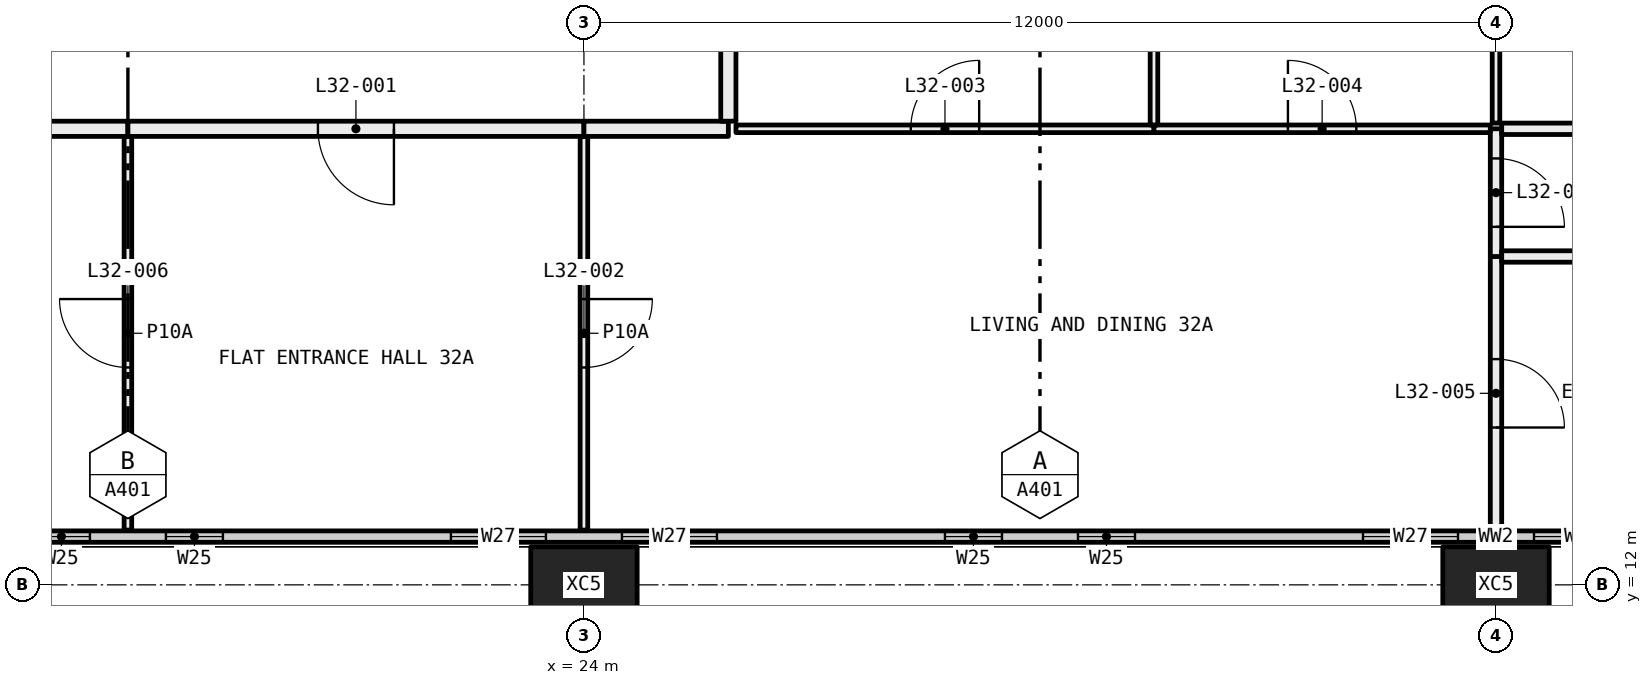
"""IFC4 building model, lengths in metres.
Left out: names, types, materials, properties, quantities, classifications, styles, units other than length and angle.
Written with IfcOpenShell. Run it as: python <this file> out.ifc"""

import sys

from ifc_helpers import new_model, si_unit, direction, frame, frame_2d, origin, origin_2d, place, context, subcontext, project, spatial, rectangle, hollow_rectangle, extrude, element, fill, save


model = new_model("IFC4")
c1 = context("Model", 3, precision=1e-05, world=origin(), true_north=direction((0.0, 1.0)))
c2 = subcontext(c1, "Body", "Model", "MODEL_VIEW")
j1 = project(units=[si_unit("LENGTHUNIT", "METRE"), si_unit("PLANEANGLEUNIT", "RADIAN")], contexts=[c1])
p1 = place(None, origin())
s1 = spatial("IfcSite", under=j1, at=p1, CompositionType="ELEMENT")
p2 = place(p1, origin())
s2 = spatial("IfcBuilding", under=s1, at=p2, CompositionType="ELEMENT")
p3 = place(p2, frame((0.0, 0.0, 124.2)))
s3 = spatial("IfcBuildingStorey", under=s2, at=p3, CompositionType="ELEMENT", Elevation=124.2)
for number, where, z_axis, x_axis in (
    (1, (24.0, 12.0, -0.4), (0.0, 0.0, 1.0), (1.0, 0.0, 0.0)),
    (2, (36.0, 12.0, -0.4), (0.0, 0.0, 1.0), (1.0, 0.0, 0.0)),
):
    element("IfcColumn", number, at=place(p3, frame(where, z_axis=z_axis, x_axis=x_axis)), inside=s3, PredefinedType="COLUMN", context=c2, shape_type="SweptSolid", body=[
        extrude(hollow_rectangle(XDim=1.4, YDim=1.0, WallThickness=0.055, at=origin_2d()), origin(), (0.0, 0.0, 1.0), 3.45),
    ])
p4 = place(p3, frame((6.56, 12.635, 0.0), z_axis=(0.0, 0.0, 1.0), x_axis=(1.0, 0.0, 0.0)))
e3 = element("IfcWall", 3, at=p4, inside=s3, PredefinedType="ELEMENTEDWALL", context=c2, shape_type="SweptSolid", body=[
    extrude(rectangle(XDim=58.88, YDim=0.15, at=frame_2d((29.44, 0.0))), origin(), (0.0, 0.0, 1.0), 3.05),
])
p5 = place(p4, frame((0.44, 0.0, 0.45)))
e4 = element("IfcOpeningElement", 4, at=p5, cuts=e3, PredefinedType="OPENING", context=c2, shape_type="SweptSolid", body=[
    extrude(rectangle(XDim=4.5, YDim=2.55, at=frame_2d((2.25, 1.275))), frame((0.0, 0.085, 0.0), z_axis=(0.0, -1.0, 0.0), x_axis=(1.0, 0.0, 0.0)), (0.0, 0.0, 1.0), 0.17),
])
p6 = place(p4, frame((5.94, 0.0, 0.45)))
e5 = element("IfcOpeningElement", 5, at=p6, cuts=e3, PredefinedType="OPENING", context=c2, shape_type="SweptSolid", body=[
    extrude(rectangle(XDim=1.25, YDim=2.55, at=frame_2d((0.625, 1.275))), frame((0.0, 0.085, 0.0), z_axis=(0.0, -1.0, 0.0), x_axis=(1.0, 0.0, 0.0)), (0.0, 0.0, 1.0), 0.17),
])
p7 = place(p4, frame((10.19, 0.0, 0.45)))
e6 = element("IfcOpeningElement", 6, at=p7, cuts=e3, PredefinedType="OPENING", context=c2, shape_type="SweptSolid", body=[
    extrude(rectangle(XDim=0.75, YDim=2.55, at=frame_2d((0.375, 1.275))), frame((0.0, 0.085, 0.0), z_axis=(0.0, -1.0, 0.0), x_axis=(1.0, 0.0, 0.0)), (0.0, 0.0, 1.0), 0.17),
])
p8 = place(p4, frame((11.94, 0.0, 0.45)))
e7 = element("IfcOpeningElement", 7, at=p8, cuts=e3, PredefinedType="OPENING", context=c2, shape_type="SweptSolid", body=[
    extrude(rectangle(XDim=0.75, YDim=2.55, at=frame_2d((0.375, 1.275))), frame((0.0, 0.085, 0.0), z_axis=(0.0, -1.0, 0.0), x_axis=(1.0, 0.0, 0.0)), (0.0, 0.0, 1.0), 0.17),
])
p9 = place(p4, frame((15.69, 0.0, 0.45)))
e8 = element("IfcOpeningElement", 8, at=p9, cuts=e3, PredefinedType="OPENING", context=c2, shape_type="SweptSolid", body=[
    extrude(rectangle(XDim=1.25, YDim=2.55, at=frame_2d((0.625, 1.275))), frame((0.0, 0.085, 0.0), z_axis=(0.0, -1.0, 0.0), x_axis=(1.0, 0.0, 0.0)), (0.0, 0.0, 1.0), 0.17),
])
p10 = place(p4, frame((17.94, 0.0, 0.45)))
e9 = element("IfcOpeningElement", 9, at=p10, cuts=e3, PredefinedType="OPENING", context=c2, shape_type="SweptSolid", body=[
    extrude(rectangle(XDim=1.25, YDim=2.55, at=frame_2d((0.625, 1.275))), frame((0.0, 0.085, 0.0), z_axis=(0.0, -1.0, 0.0), x_axis=(1.0, 0.0, 0.0)), (0.0, 0.0, 1.0), 0.17),
])
p11 = place(p4, frame((22.19, 0.0, 0.45)))
e10 = element("IfcOpeningElement", 10, at=p11, cuts=e3, PredefinedType="OPENING", context=c2, shape_type="SweptSolid", body=[
    extrude(rectangle(XDim=0.75, YDim=2.55, at=frame_2d((0.375, 1.275))), frame((0.0, 0.085, 0.0), z_axis=(0.0, -1.0, 0.0), x_axis=(1.0, 0.0, 0.0)), (0.0, 0.0, 1.0), 0.17),
])
p12 = place(p4, frame((23.94, 0.0, 0.45)))
e11 = element("IfcOpeningElement", 11, at=p12, cuts=e3, PredefinedType="OPENING", context=c2, shape_type="SweptSolid", body=[
    extrude(rectangle(XDim=0.75, YDim=2.55, at=frame_2d((0.375, 1.275))), frame((0.0, 0.085, 0.0), z_axis=(0.0, -1.0, 0.0), x_axis=(1.0, 0.0, 0.0)), (0.0, 0.0, 1.0), 0.17),
])
p13 = place(p4, frame((27.69, 0.0, 0.45)))
e12 = element("IfcOpeningElement", 12, at=p13, cuts=e3, PredefinedType="OPENING", context=c2, shape_type="SweptSolid", body=[
    extrude(rectangle(XDim=1.25, YDim=2.55, at=frame_2d((0.625, 1.275))), frame((0.0, 0.085, 0.0), z_axis=(0.0, -1.0, 0.0), x_axis=(1.0, 0.0, 0.0)), (0.0, 0.0, 1.0), 0.17),
])
p14 = place(p4, frame((29.94, 0.0, 0.45)))
e13 = element("IfcOpeningElement", 13, at=p14, cuts=e3, PredefinedType="OPENING", context=c2, shape_type="SweptSolid", body=[
    extrude(rectangle(XDim=1.25, YDim=2.55, at=frame_2d((0.625, 1.275))), frame((0.0, 0.085, 0.0), z_axis=(0.0, -1.0, 0.0), x_axis=(1.0, 0.0, 0.0)), (0.0, 0.0, 1.0), 0.17),
])
p15 = place(p4, frame((34.19, 0.0, 0.45)))
e14 = element("IfcOpeningElement", 14, at=p15, cuts=e3, PredefinedType="OPENING", context=c2, shape_type="SweptSolid", body=[
    extrude(rectangle(XDim=0.75, YDim=2.55, at=frame_2d((0.375, 1.275))), frame((0.0, 0.085, 0.0), z_axis=(0.0, -1.0, 0.0), x_axis=(1.0, 0.0, 0.0)), (0.0, 0.0, 1.0), 0.17),
])
p16 = place(p4, frame((35.94, 0.0, 0.45)))
e15 = element("IfcOpeningElement", 15, at=p16, cuts=e3, PredefinedType="OPENING", context=c2, shape_type="SweptSolid", body=[
    extrude(rectangle(XDim=0.75, YDim=2.55, at=frame_2d((0.375, 1.275))), frame((0.0, 0.085, 0.0), z_axis=(0.0, -1.0, 0.0), x_axis=(1.0, 0.0, 0.0)), (0.0, 0.0, 1.0), 0.17),
])
p17 = place(p4, frame((39.69, 0.0, 0.45)))
e16 = element("IfcOpeningElement", 16, at=p17, cuts=e3, PredefinedType="OPENING", context=c2, shape_type="SweptSolid", body=[
    extrude(rectangle(XDim=1.25, YDim=2.55, at=frame_2d((0.625, 1.275))), frame((0.0, 0.085, 0.0), z_axis=(0.0, -1.0, 0.0), x_axis=(1.0, 0.0, 0.0)), (0.0, 0.0, 1.0), 0.17),
])
p18 = place(p4, frame((41.94, 0.0, 0.45)))
e17 = element("IfcOpeningElement", 17, at=p18, cuts=e3, PredefinedType="OPENING", context=c2, shape_type="SweptSolid", body=[
    extrude(rectangle(XDim=1.25, YDim=2.55, at=frame_2d((0.625, 1.275))), frame((0.0, 0.085, 0.0), z_axis=(0.0, -1.0, 0.0), x_axis=(1.0, 0.0, 0.0)), (0.0, 0.0, 1.0), 0.17),
])
p19 = place(p4, frame((46.19, 0.0, 0.45)))
e18 = element("IfcOpeningElement", 18, at=p19, cuts=e3, PredefinedType="OPENING", context=c2, shape_type="SweptSolid", body=[
    extrude(rectangle(XDim=0.75, YDim=2.55, at=frame_2d((0.375, 1.275))), frame((0.0, 0.085, 0.0), z_axis=(0.0, -1.0, 0.0), x_axis=(1.0, 0.0, 0.0)), (0.0, 0.0, 1.0), 0.17),
])
p20 = place(p4, frame((47.94, 0.0, 0.45)))
e19 = element("IfcOpeningElement", 19, at=p20, cuts=e3, PredefinedType="OPENING", context=c2, shape_type="SweptSolid", body=[
    extrude(rectangle(XDim=0.75, YDim=2.55, at=frame_2d((0.375, 1.275))), frame((0.0, 0.085, 0.0), z_axis=(0.0, -1.0, 0.0), x_axis=(1.0, 0.0, 0.0)), (0.0, 0.0, 1.0), 0.17),
])
p21 = place(p4, frame((51.69, 0.0, 0.45)))
e20 = element("IfcOpeningElement", 20, at=p21, cuts=e3, PredefinedType="OPENING", context=c2, shape_type="SweptSolid", body=[
    extrude(rectangle(XDim=1.25, YDim=2.55, at=frame_2d((0.625, 1.275))), frame((0.0, 0.085, 0.0), z_axis=(0.0, -1.0, 0.0), x_axis=(1.0, 0.0, 0.0)), (0.0, 0.0, 1.0), 0.17),
])
p22 = place(p4, frame((53.94, 0.0, 0.45)))
e21 = element("IfcOpeningElement", 21, at=p22, cuts=e3, PredefinedType="OPENING", context=c2, shape_type="SweptSolid", body=[
    extrude(rectangle(XDim=4.5, YDim=2.55, at=frame_2d((2.25, 1.275))), frame((0.0, 0.085, 0.0), z_axis=(0.0, -1.0, 0.0), x_axis=(1.0, 0.0, 0.0)), (0.0, 0.0, 1.0), 0.17),
])
p23 = place(p3, frame((18.0, 12.72, 0.0), z_axis=(0.0, 0.0, 1.0), x_axis=(0.0, 1.0, 0.0)))
e22 = element("IfcWall", 22, at=p23, inside=s3, PredefinedType="PARTITIONING", context=c2, shape_type="SweptSolid", body=[
    extrude(rectangle(XDim=5.18, YDim=0.1, at=frame_2d((2.59, 0.0))), origin(), (0.0, 0.0, 1.0), 3.05),
])
p24 = place(p23, frame((2.14, 0.0, 0.0)))
e23 = element("IfcOpeningElement", 23, at=p24, cuts=e22, PredefinedType="OPENING", context=c2, shape_type="SweptSolid", body=[
    extrude(rectangle(XDim=0.9, YDim=2.1, at=frame_2d((0.45, 1.05))), frame((0.0, 0.06, 0.0), z_axis=(0.0, -1.0, 0.0), x_axis=(1.0, 0.0, 0.0)), (0.0, 0.0, 1.0), 0.12),
])
p25 = place(p3, frame((18.0, 18.0, 0.0), z_axis=(0.0, 0.0, 1.0), x_axis=(-1.0, 0.0, 0.0)))
e24 = element("IfcWall", 24, at=p25, inside=s3, PredefinedType="PARTITIONING", context=c2, shape_type="SweptSolid", body=[
    extrude(rectangle(XDim=6.0, YDim=0.2, at=frame_2d((3.0, 0.0))), origin(), (0.0, 0.0, 1.0), 3.05),
])
p26 = place(p3, frame((24.0, 12.72, 0.0), z_axis=(0.0, 0.0, 1.0), x_axis=(0.0, 1.0, 0.0)))
e25 = element("IfcWall", 25, at=p26, inside=s3, PredefinedType="PARTITIONING", context=c2, shape_type="SweptSolid", body=[
    extrude(rectangle(XDim=5.18, YDim=0.1, at=frame_2d((2.59, 0.0))), origin(), (0.0, 0.0, 1.0), 3.05),
])
p27 = place(p26, frame((2.14, 0.0, 0.0)))
e26 = element("IfcOpeningElement", 26, at=p27, cuts=e25, PredefinedType="OPENING", context=c2, shape_type="SweptSolid", body=[
    extrude(rectangle(XDim=0.9, YDim=2.1, at=frame_2d((0.45, 1.05))), frame((0.0, 0.06, 0.0), z_axis=(0.0, -1.0, 0.0), x_axis=(1.0, 0.0, 0.0)), (0.0, 0.0, 1.0), 0.12),
])
p28 = place(p3, frame((24.0, 18.0, 0.0), z_axis=(0.0, 0.0, 1.0), x_axis=(-1.0, 0.0, 0.0)))
e27 = element("IfcWall", 27, at=p28, inside=s3, PredefinedType="PARTITIONING", context=c2, shape_type="SweptSolid", body=[
    extrude(rectangle(XDim=6.0, YDim=0.2, at=frame_2d((3.0, 0.0))), origin(), (0.0, 0.0, 1.0), 3.05),
])
p29 = place(p28, frame((2.5, 0.0, 0.0)))
e28 = element("IfcOpeningElement", 28, at=p29, cuts=e27, PredefinedType="OPENING", context=c2, shape_type="SweptSolid", body=[
    extrude(rectangle(XDim=1.0, YDim=2.1, at=frame_2d((0.5, 1.05))), frame((0.0, 0.11, 0.0), z_axis=(0.0, -1.0, 0.0), x_axis=(1.0, 0.0, 0.0)), (0.0, 0.0, 1.0), 0.22),
])
p30 = place(p3, frame((36.0, 12.72, 0.0), z_axis=(0.0, 0.0, 1.0), x_axis=(0.0, 1.0, 0.0)))
e29 = element("IfcWall", 29, at=p30, inside=s3, PredefinedType="PARTITIONING", context=c2, shape_type="SweptSolid", body=[
    extrude(rectangle(XDim=3.6, YDim=0.15, at=frame_2d((1.8, 0.0))), origin(), (0.0, 0.0, 1.0), 2.45),
])
p31 = place(p30, frame((1.35, 0.0, 0.0)))
e30 = element("IfcOpeningElement", 30, at=p31, cuts=e29, PredefinedType="OPENING", context=c2, shape_type="SweptSolid", body=[
    extrude(rectangle(XDim=0.9, YDim=2.1, at=frame_2d((0.45, 1.05))), frame((0.0, 0.085, 0.0), z_axis=(0.0, -1.0, 0.0), x_axis=(1.0, 0.0, 0.0)), (0.0, 0.0, 1.0), 0.17),
])
p32 = place(p3, frame((36.0, 16.32, 0.0), z_axis=(0.0, 0.0, 1.0), x_axis=(0.0, 1.0, 0.0)))
e31 = element("IfcWall", 31, at=p32, inside=s3, PredefinedType="PARTITIONING", context=c2, shape_type="SweptSolid", body=[
    extrude(rectangle(XDim=1.68, YDim=0.15, at=frame_2d((0.84, 0.0))), origin(), (0.0, 0.0, 1.0), 2.45),
])
p33 = place(p32, frame((0.39, 0.0, 0.0)))
e32 = element("IfcOpeningElement", 32, at=p33, cuts=e31, PredefinedType="OPENING", context=c2, shape_type="SweptSolid", body=[
    extrude(rectangle(XDim=0.9, YDim=2.1, at=frame_2d((0.45, 1.05))), frame((0.0, 0.085, 0.0), z_axis=(0.0, -1.0, 0.0), x_axis=(1.0, 0.0, 0.0)), (0.0, 0.0, 1.0), 0.17),
])
p34 = place(p3, frame((31.5, 18.0, 0.0), z_axis=(0.0, 0.0, 1.0), x_axis=(-1.0, 0.0, 0.0)))
e33 = element("IfcWall", 33, at=p34, inside=s3, PredefinedType="PARTITIONING", context=c2, shape_type="SweptSolid", body=[
    extrude(rectangle(XDim=5.5, YDim=0.1, at=frame_2d((2.75, 0.0))), origin(), (0.0, 0.0, 1.0), 3.05),
])
p35 = place(p34, frame((2.3, 0.0, 0.0)))
e34 = element("IfcOpeningElement", 34, at=p35, cuts=e33, PredefinedType="OPENING", context=c2, shape_type="SweptSolid", body=[
    extrude(rectangle(XDim=0.9, YDim=2.1, at=frame_2d((0.45, 1.05))), frame((0.0, 0.06, 0.0), z_axis=(0.0, -1.0, 0.0), x_axis=(1.0, 0.0, 0.0)), (0.0, 0.0, 1.0), 0.12),
])
p36 = place(p3, frame((35.925, 18.0, 0.0), z_axis=(0.0, 0.0, 1.0), x_axis=(-1.0, 0.0, 0.0)))
e35 = element("IfcWall", 35, at=p36, inside=s3, PredefinedType="PARTITIONING", context=c2, shape_type="SweptSolid", body=[
    extrude(rectangle(XDim=4.425, YDim=0.1, at=frame_2d((2.212, 0.0))), origin(), (0.0, 0.0, 1.0), 2.45),
])
p37 = place(p36, frame((1.762, 0.0, 0.0)))
e36 = element("IfcOpeningElement", 36, at=p37, cuts=e35, PredefinedType="OPENING", context=c2, shape_type="SweptSolid", body=[
    extrude(rectangle(XDim=0.9, YDim=2.1, at=frame_2d((0.45, 1.05))), frame((0.0, 0.06, 0.0), z_axis=(0.0, -1.0, 0.0), x_axis=(1.0, 0.0, 0.0)), (0.0, 0.0, 1.0), 0.12),
])
p38 = place(p3, frame((25.9, 18.0, 0.0), z_axis=(0.0, 0.0, 1.0), x_axis=(-1.0, 0.0, 0.0)))
e37 = element("IfcWall", 37, at=p38, inside=s3, PredefinedType="PARTITIONING", context=c2, shape_type="SweptSolid", body=[
    extrude(rectangle(XDim=1.9, YDim=0.2, at=frame_2d((0.95, 0.0))), origin(), (0.0, 0.0, 1.0), 3.05),
])
for number, where, z_axis, x_axis in (
    (38, (41.9, 16.32, 0.0), (0.0, 0.0, 1.0), (-1.0, 0.0, 0.0)),
    (39, (41.9, 18.0, 0.0), (0.0, 0.0, 1.0), (-1.0, 0.0, 0.0)),
):
    element("IfcWall", number, at=place(p3, frame(where, z_axis=z_axis, x_axis=x_axis)), inside=s3, PredefinedType="PARTITIONING", context=c2, shape_type="SweptSolid", body=[
        extrude(rectangle(XDim=5.825, YDim=0.15, at=frame_2d((2.913, 0.0))), origin(), (0.0, 0.0, 1.0), 2.45),
    ])
p39 = place(p3, frame((31.5, 18.05, 0.0), z_axis=(0.0, 0.0, 1.0), x_axis=(0.0, 1.0, 0.0)))
e40 = element("IfcWall", 40, at=p39, inside=s3, PredefinedType="PARTITIONING", context=c2, shape_type="SweptSolid", body=[
    extrude(rectangle(XDim=6.25, YDim=0.1, at=frame_2d((3.125, 0.0))), origin(), (0.0, 0.0, 1.0), 2.45),
])
p40 = place(p3, frame((25.9, 23.9, 0.0), z_axis=(0.0, 0.0, 1.0), x_axis=(0.0, -1.0, 0.0)))
e41 = element("IfcWall", 41, at=p40, inside=s3, PredefinedType="PARTITIONING", context=c2, shape_type="SweptSolid", body=[
    extrude(rectangle(XDim=5.8, YDim=0.2, at=frame_2d((2.9, 0.0))), origin(), (0.0, 0.0, 1.0), 3.05),
])
p41 = place(p3, frame((36.0, 18.075, 0.0), z_axis=(0.0, 0.0, 1.0), x_axis=(0.0, 1.0, 0.0)))
e42 = element("IfcWall", 42, at=p41, inside=s3, PredefinedType="PARTITIONING", context=c2, shape_type="SweptSolid", body=[
    extrude(rectangle(XDim=5.175, YDim=0.1, at=frame_2d((2.587, 0.0))), origin(), (0.0, 0.0, 1.0), 2.45),
])
p42 = place(p41, frame((2.137, 0.0, 0.0)))
e43 = element("IfcOpeningElement", 43, at=p42, cuts=e42, PredefinedType="OPENING", context=c2, shape_type="SweptSolid", body=[
    extrude(rectangle(XDim=0.9, YDim=2.1, at=frame_2d((0.45, 1.05))), frame((0.0, 0.06, 0.0), z_axis=(0.0, -1.0, 0.0), x_axis=(1.0, 0.0, 0.0)), (0.0, 0.0, 1.0), 0.12),
])
p43 = place(p7, origin())
e44 = element("IfcWindow", 44, at=p43, inside=s3, PartitioningType="SINGLE_PANEL", PredefinedType="WINDOW", context=c2, shape_type="SweptSolid", body=[
    extrude(rectangle(XDim=0.75, YDim=2.55, at=frame_2d((0.375, 1.275))), frame((0.0, 0.03, 0.0), z_axis=(0.0, -1.0, 0.0), x_axis=(1.0, 0.0, 0.0)), (0.0, 0.0, 1.0), 0.06),
])
fill(e6, e44)
p44 = place(p8, origin())
e45 = element("IfcWindow", 45, at=p44, inside=s3, PartitioningType="SINGLE_PANEL", PredefinedType="WINDOW", context=c2, shape_type="SweptSolid", body=[
    extrude(rectangle(XDim=0.75, YDim=2.55, at=frame_2d((0.375, 1.275))), frame((0.0, 0.03, 0.0), z_axis=(0.0, -1.0, 0.0), x_axis=(1.0, 0.0, 0.0)), (0.0, 0.0, 1.0), 0.06),
])
fill(e7, e45)
p45 = place(p9, origin())
e46 = element("IfcWindow", 46, at=p45, inside=s3, PartitioningType="SINGLE_PANEL", PredefinedType="WINDOW", context=c2, shape_type="SweptSolid", body=[
    extrude(rectangle(XDim=1.25, YDim=2.55, at=frame_2d((0.625, 1.275))), frame((0.0, 0.03, 0.0), z_axis=(0.0, -1.0, 0.0), x_axis=(1.0, 0.0, 0.0)), (0.0, 0.0, 1.0), 0.06),
])
fill(e8, e46)
p46 = place(p10, origin())
e47 = element("IfcWindow", 47, at=p46, inside=s3, PartitioningType="SINGLE_PANEL", PredefinedType="WINDOW", context=c2, shape_type="SweptSolid", body=[
    extrude(rectangle(XDim=1.25, YDim=2.55, at=frame_2d((0.625, 1.275))), frame((0.0, 0.03, 0.0), z_axis=(0.0, -1.0, 0.0), x_axis=(1.0, 0.0, 0.0)), (0.0, 0.0, 1.0), 0.06),
])
fill(e9, e47)
p47 = place(p11, origin())
e48 = element("IfcWindow", 48, at=p47, inside=s3, PartitioningType="SINGLE_PANEL", PredefinedType="WINDOW", context=c2, shape_type="SweptSolid", body=[
    extrude(rectangle(XDim=0.75, YDim=2.55, at=frame_2d((0.375, 1.275))), frame((0.0, 0.03, 0.0), z_axis=(0.0, -1.0, 0.0), x_axis=(1.0, 0.0, 0.0)), (0.0, 0.0, 1.0), 0.06),
])
fill(e10, e48)
p48 = place(p12, origin())
e49 = element("IfcWindow", 49, at=p48, inside=s3, PartitioningType="SINGLE_PANEL", PredefinedType="WINDOW", context=c2, shape_type="SweptSolid", body=[
    extrude(rectangle(XDim=0.75, YDim=2.55, at=frame_2d((0.375, 1.275))), frame((0.0, 0.03, 0.0), z_axis=(0.0, -1.0, 0.0), x_axis=(1.0, 0.0, 0.0)), (0.0, 0.0, 1.0), 0.06),
])
fill(e11, e49)
p49 = place(p13, origin())
e50 = element("IfcWindow", 50, at=p49, inside=s3, PartitioningType="SINGLE_PANEL", PredefinedType="WINDOW", context=c2, shape_type="SweptSolid", body=[
    extrude(rectangle(XDim=1.25, YDim=2.55, at=frame_2d((0.625, 1.275))), frame((0.0, 0.03, 0.0), z_axis=(0.0, -1.0, 0.0), x_axis=(1.0, 0.0, 0.0)), (0.0, 0.0, 1.0), 0.06),
])
fill(e12, e50)
p50 = place(p14, origin())
e51 = element("IfcWindow", 51, at=p50, inside=s3, PartitioningType="SINGLE_PANEL", PredefinedType="WINDOW", context=c2, shape_type="SweptSolid", body=[
    extrude(rectangle(XDim=1.25, YDim=2.55, at=frame_2d((0.625, 1.275))), frame((0.0, 0.03, 0.0), z_axis=(0.0, -1.0, 0.0), x_axis=(1.0, 0.0, 0.0)), (0.0, 0.0, 1.0), 0.06),
])
fill(e13, e51)
p51 = place(p29, origin())
e52 = element("IfcDoor", 52, at=p51, inside=s3, OperationType="SINGLE_SWING_RIGHT", PredefinedType="DOOR", context=c2, shape_type="SweptSolid", body=[
    extrude(rectangle(XDim=1.0, YDim=2.1, at=frame_2d((0.5, 1.05))), frame((0.0, 0.025, 0.0), z_axis=(0.0, -1.0, 0.0), x_axis=(1.0, 0.0, 0.0)), (0.0, 0.0, 1.0), 0.05),
])
fill(e28, e52)
p52 = place(p27, frame((0.9, 0.0, 0.0), x_axis=(-1.0, 0.0, 0.0)))
e53 = element("IfcDoor", 53, at=p52, inside=s3, OperationType="SINGLE_SWING_RIGHT", PredefinedType="DOOR", context=c2, shape_type="SweptSolid", body=[
    extrude(rectangle(XDim=0.9, YDim=2.1, at=frame_2d((0.45, 1.05))), frame((0.0, 0.025, 0.0), z_axis=(0.0, -1.0, 0.0), x_axis=(1.0, 0.0, 0.0)), (0.0, 0.0, 1.0), 0.05),
])
fill(e26, e53)
p53 = place(p35, frame((0.9, 0.0, 0.0), x_axis=(-1.0, 0.0, 0.0)))
e54 = element("IfcDoor", 54, at=p53, inside=s3, OperationType="SINGLE_SWING_LEFT", PredefinedType="DOOR", context=c2, shape_type="SweptSolid", body=[
    extrude(rectangle(XDim=0.9, YDim=2.1, at=frame_2d((0.45, 1.05))), frame((0.0, 0.025, 0.0), z_axis=(0.0, -1.0, 0.0), x_axis=(1.0, 0.0, 0.0)), (0.0, 0.0, 1.0), 0.05),
])
fill(e34, e54)
p54 = place(p37, frame((0.9, 0.0, 0.0), x_axis=(-1.0, 0.0, 0.0)))
e55 = element("IfcDoor", 55, at=p54, inside=s3, OperationType="SINGLE_SWING_RIGHT", PredefinedType="DOOR", context=c2, shape_type="SweptSolid", body=[
    extrude(rectangle(XDim=0.9, YDim=2.1, at=frame_2d((0.45, 1.05))), frame((0.0, 0.025, 0.0), z_axis=(0.0, -1.0, 0.0), x_axis=(1.0, 0.0, 0.0)), (0.0, 0.0, 1.0), 0.05),
])
fill(e36, e55)
p55 = place(p31, frame((0.9, 0.0, 0.0), x_axis=(-1.0, 0.0, 0.0)))
e56 = element("IfcDoor", 56, at=p55, inside=s3, OperationType="SINGLE_SWING_LEFT", PredefinedType="DOOR", context=c2, shape_type="SweptSolid", body=[
    extrude(rectangle(XDim=0.9, YDim=2.1, at=frame_2d((0.45, 1.05))), frame((0.0, 0.025, 0.0), z_axis=(0.0, -1.0, 0.0), x_axis=(1.0, 0.0, 0.0)), (0.0, 0.0, 1.0), 0.05),
])
fill(e30, e56)
p56 = place(p24, origin())
e57 = element("IfcDoor", 57, at=p56, inside=s3, OperationType="SINGLE_SWING_LEFT", PredefinedType="DOOR", context=c2, shape_type="SweptSolid", body=[
    extrude(rectangle(XDim=0.9, YDim=2.1, at=frame_2d((0.45, 1.05))), frame((0.0, 0.025, 0.0), z_axis=(0.0, -1.0, 0.0), x_axis=(1.0, 0.0, 0.0)), (0.0, 0.0, 1.0), 0.05),
])
fill(e23, e57)
p57 = place(p33, frame((0.9, 0.0, 0.0), x_axis=(-1.0, 0.0, 0.0)))
e58 = element("IfcDoor", 58, at=p57, inside=s3, OperationType="SINGLE_SWING_LEFT", PredefinedType="DOOR", context=c2, shape_type="SweptSolid", body=[
    extrude(rectangle(XDim=0.9, YDim=2.1, at=frame_2d((0.45, 1.05))), frame((0.0, 0.025, 0.0), z_axis=(0.0, -1.0, 0.0), x_axis=(1.0, 0.0, 0.0)), (0.0, 0.0, 1.0), 0.05),
])
fill(e32, e58)
save(model, sys.argv[1])
